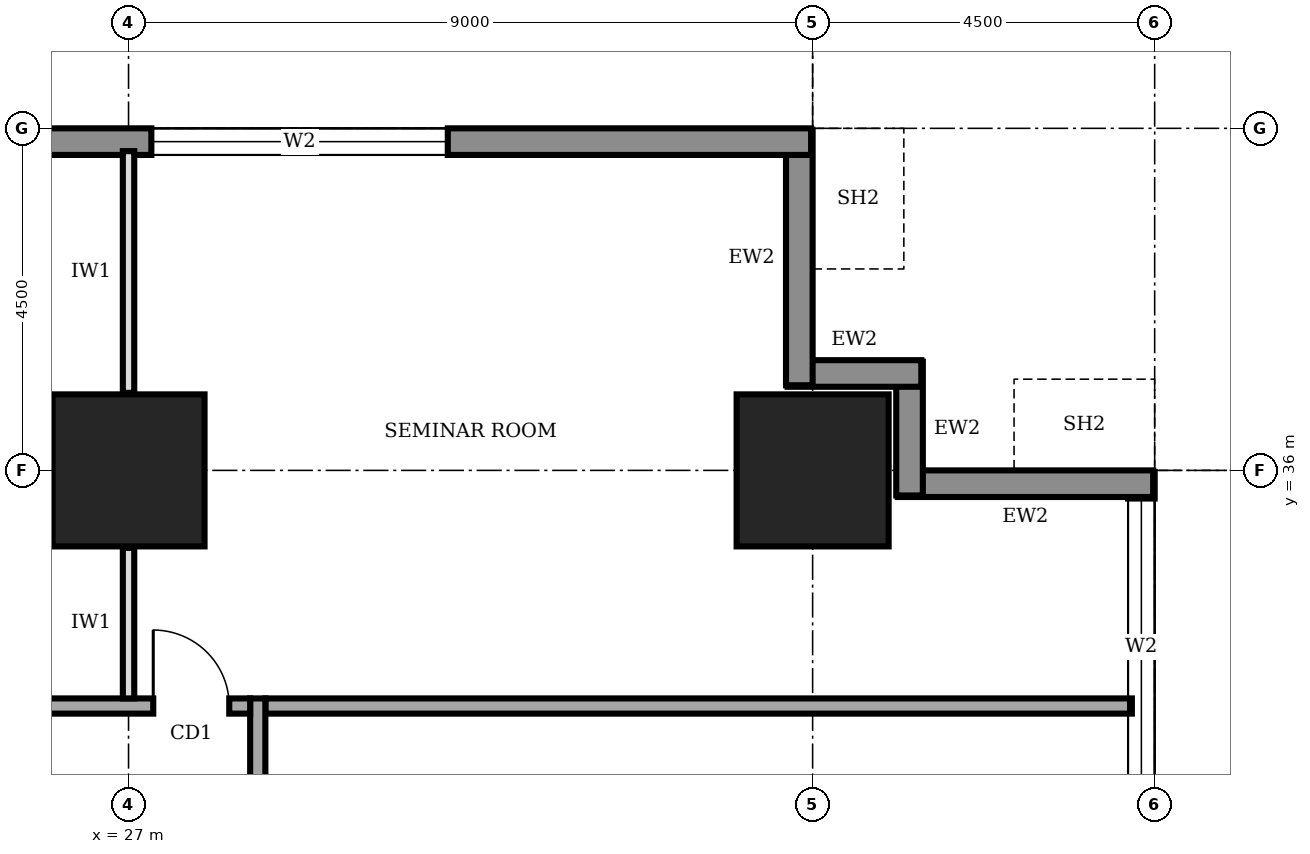
"""IFC4 building model, lengths in metres.
Left out: names, types, materials, properties, quantities, classifications, styles, units other than length and angle.
Written with IfcOpenShell. Run it as: python <this file> out.ifc"""

import sys

from ifc_helpers import new_model, si_unit, direction, frame, frame_2d, origin, origin_2d, place, context, subcontext, project, spatial, rectangle, extrude, element, fill, save


model = new_model("IFC4")
c1 = context("Model", 3, precision=1e-05, world=origin(), true_north=direction((0.0, 1.0)))
c2 = subcontext(c1, "Body", "Model", "MODEL_VIEW")
j1 = project(units=[si_unit("LENGTHUNIT", "METRE"), si_unit("PLANEANGLEUNIT", "RADIAN")], contexts=[c1])
p1 = place(None, origin())
s1 = spatial("IfcSite", under=j1, at=p1, CompositionType="ELEMENT")
p2 = place(p1, origin())
s2 = spatial("IfcBuilding", under=s1, at=p2, CompositionType="ELEMENT")
p3 = place(p2, frame((0.0, 0.0, 53.0)))
s3 = spatial("IfcBuildingStorey", under=s2, at=p3, CompositionType="ELEMENT", Elevation=53.0)
for number, where, z_axis, x_axis in (
    (1, (27.0, 36.0, 0.0), (0.0, 0.0, 1.0), (1.0, 0.0, 0.0)),
    (2, (36.0, 36.0, 0.0), (0.0, 0.0, 1.0), (1.0, 0.0, 0.0)),
):
    element("IfcColumn", number, at=place(p3, frame(where, z_axis=z_axis, x_axis=x_axis)), inside=s3, PredefinedType="COLUMN", context=c2, shape_type="SweptSolid", body=[
        extrude(rectangle(XDim=2.0, YDim=2.0, at=origin_2d()), origin(), (0.0, 0.0, 1.0), 4.0),
    ])
p4 = place(p3, frame((40.325, 4.52, 0.0), z_axis=(0.0, 0.0, 1.0), x_axis=(0.0, 1.0, 0.0)))
e3 = element("IfcWall", 3, at=p4, inside=s3, PredefinedType="STANDARD", context=c2, shape_type="SweptSolid", body=[
    extrude(rectangle(XDim=31.46, YDim=0.35, at=frame_2d((15.73, 0.0))), origin(), (0.0, 0.0, 1.0), 3.75),
])
p5 = place(p4, frame((4.78, 0.0, 0.6)))
e4 = element("IfcOpeningElement", 4, at=p5, cuts=e3, PredefinedType="OPENING", context=c2, shape_type="SweptSolid", body=[
    extrude(rectangle(XDim=3.9, YDim=2.6, at=frame_2d((1.95, 1.3))), frame((0.0, 0.185, 0.0), z_axis=(0.0, -1.0, 0.0), x_axis=(1.0, 0.0, 0.0)), (0.0, 0.0, 1.0), 0.37),
])
p6 = place(p4, frame((9.28, 0.0, 0.6)))
e5 = element("IfcOpeningElement", 5, at=p6, cuts=e3, PredefinedType="OPENING", context=c2, shape_type="SweptSolid", body=[
    extrude(rectangle(XDim=3.9, YDim=2.6, at=frame_2d((1.95, 1.3))), frame((0.0, 0.185, 0.0), z_axis=(0.0, -1.0, 0.0), x_axis=(1.0, 0.0, 0.0)), (0.0, 0.0, 1.0), 0.37),
])
p7 = place(p4, frame((13.78, 0.0, 0.6)))
e6 = element("IfcOpeningElement", 6, at=p7, cuts=e3, PredefinedType="OPENING", context=c2, shape_type="SweptSolid", body=[
    extrude(rectangle(XDim=3.9, YDim=2.6, at=frame_2d((1.95, 1.3))), frame((0.0, 0.185, 0.0), z_axis=(0.0, -1.0, 0.0), x_axis=(1.0, 0.0, 0.0)), (0.0, 0.0, 1.0), 0.37),
])
p8 = place(p4, frame((18.28, 0.0, 0.6)))
e7 = element("IfcOpeningElement", 7, at=p8, cuts=e3, PredefinedType="OPENING", context=c2, shape_type="SweptSolid", body=[
    extrude(rectangle(XDim=3.9, YDim=2.6, at=frame_2d((1.95, 1.3))), frame((0.0, 0.185, 0.0), z_axis=(0.0, -1.0, 0.0), x_axis=(1.0, 0.0, 0.0)), (0.0, 0.0, 1.0), 0.37),
])
p9 = place(p4, frame((22.78, 0.0, 0.6)))
e8 = element("IfcOpeningElement", 8, at=p9, cuts=e3, PredefinedType="OPENING", context=c2, shape_type="SweptSolid", body=[
    extrude(rectangle(XDim=3.9, YDim=2.6, at=frame_2d((1.95, 1.3))), frame((0.0, 0.185, 0.0), z_axis=(0.0, -1.0, 0.0), x_axis=(1.0, 0.0, 0.0)), (0.0, 0.0, 1.0), 0.37),
])
p10 = place(p4, frame((27.21, 0.0, 0.6)))
e9 = element("IfcOpeningElement", 9, at=p10, cuts=e3, PredefinedType="OPENING", context=c2, shape_type="SweptSolid", body=[
    extrude(rectangle(XDim=3.9, YDim=2.6, at=frame_2d((1.95, 1.3))), frame((0.0, 0.185, 0.0), z_axis=(0.0, -1.0, 0.0), x_axis=(1.0, 0.0, 0.0)), (0.0, 0.0, 1.0), 0.37),
])
p11 = place(p3, frame((40.48, 35.825, 0.0), z_axis=(0.0, 0.0, 1.0), x_axis=(-1.0, 0.0, 0.0)))
e10 = element("IfcWall", 10, at=p11, inside=s3, PredefinedType="STANDARD", context=c2, shape_type="SweptSolid", body=[
    extrude(rectangle(XDim=3.36, YDim=0.35, at=frame_2d((1.68, 0.0))), origin(), (0.0, 0.0, 1.0), 2.85),
])
for number, where, z_axis, x_axis in (
    (11, (37.275, 35.67, 0.0), (0.0, 0.0, 1.0), (0.0, 1.0, 0.0)),
    (12, (37.43, 37.275, 0.0), (0.0, 0.0, 1.0), (-1.0, 0.0, 0.0)),
):
    element("IfcWall", number, at=place(p3, frame(where, z_axis=z_axis, x_axis=x_axis)), inside=s3, PredefinedType="STANDARD", context=c2, shape_type="SweptSolid", body=[
        extrude(rectangle(XDim=1.76, YDim=0.35, at=frame_2d((0.88, 0.0))), origin(), (0.0, 0.0, 1.0), 3.75),
    ])
p12 = place(p3, frame((35.825, 37.12, 0.0), z_axis=(0.0, 0.0, 1.0), x_axis=(0.0, 1.0, 0.0)))
e13 = element("IfcWall", 13, at=p12, inside=s3, PredefinedType="STANDARD", context=c2, shape_type="SweptSolid", body=[
    extrude(rectangle(XDim=3.36, YDim=0.35, at=frame_2d((1.68, 0.0))), origin(), (0.0, 0.0, 1.0), 2.85),
])
p13 = place(p3, frame((35.98, 40.325, 0.0), z_axis=(0.0, 0.0, 1.0), x_axis=(-1.0, 0.0, 0.0)))
e14 = element("IfcWall", 14, at=p13, inside=s3, PredefinedType="STANDARD", context=c2, shape_type="SweptSolid", body=[
    extrude(rectangle(XDim=31.46, YDim=0.35, at=frame_2d((15.73, 0.0))), origin(), (0.0, 0.0, 1.0), 3.75),
])
p14 = place(p13, frame((27.21, 0.0, 0.6)))
e15 = element("IfcOpeningElement", 15, at=p14, cuts=e14, PredefinedType="OPENING", context=c2, shape_type="SweptSolid", body=[
    extrude(rectangle(XDim=3.9, YDim=2.6, at=frame_2d((1.95, 1.3))), frame((0.0, 0.185, 0.0), z_axis=(0.0, -1.0, 0.0), x_axis=(1.0, 0.0, 0.0)), (0.0, 0.0, 1.0), 0.37),
])
p15 = place(p13, frame((22.78, 0.0, 0.6)))
e16 = element("IfcOpeningElement", 16, at=p15, cuts=e14, PredefinedType="OPENING", context=c2, shape_type="SweptSolid", body=[
    extrude(rectangle(XDim=3.9, YDim=2.6, at=frame_2d((1.95, 1.3))), frame((0.0, 0.185, 0.0), z_axis=(0.0, -1.0, 0.0), x_axis=(1.0, 0.0, 0.0)), (0.0, 0.0, 1.0), 0.37),
])
p16 = place(p13, frame((4.78, 0.0, 0.6)))
e17 = element("IfcOpeningElement", 17, at=p16, cuts=e14, PredefinedType="OPENING", context=c2, shape_type="SweptSolid", body=[
    extrude(rectangle(XDim=3.9, YDim=2.6, at=frame_2d((1.95, 1.3))), frame((0.0, 0.185, 0.0), z_axis=(0.0, -1.0, 0.0), x_axis=(1.0, 0.0, 0.0)), (0.0, 0.0, 1.0), 0.37),
])
p17 = place(p3, frame((28.7, 9.2, 0.0), z_axis=(0.0, 0.0, 1.0), x_axis=(0.0, 1.0, 0.0)))
e18 = element("IfcWall", 18, at=p17, inside=s3, PredefinedType="SOLIDWALL", context=c2, shape_type="SweptSolid", body=[
    extrude(rectangle(XDim=23.8, YDim=0.2, at=frame_2d((11.9, 0.0))), origin(), (0.0, 0.0, 1.0), 3.75),
])
p18 = place(p17, frame((3.4, 0.0, 0.0)))
e19 = element("IfcOpeningElement", 19, at=p18, cuts=e18, PredefinedType="OPENING", context=c2, shape_type="SweptSolid", body=[
    extrude(rectangle(XDim=1.8, YDim=2.1, at=frame_2d((0.9, 1.05))), frame((0.0, 0.11, 0.0), z_axis=(0.0, -1.0, 0.0), x_axis=(1.0, 0.0, 0.0)), (0.0, 0.0, 1.0), 0.22),
])
p19 = place(p17, frame((10.55, 0.0, 0.0)))
e20 = element("IfcOpeningElement", 20, at=p19, cuts=e18, PredefinedType="OPENING", context=c2, shape_type="SweptSolid", body=[
    extrude(rectangle(XDim=1.0, YDim=2.1, at=frame_2d((0.5, 1.05))), frame((0.0, 0.11, 0.0), z_axis=(0.0, -1.0, 0.0), x_axis=(1.0, 0.0, 0.0)), (0.0, 0.0, 1.0), 0.22),
])
p20 = place(p17, frame((17.65, 0.0, 0.0)))
e21 = element("IfcOpeningElement", 21, at=p20, cuts=e18, PredefinedType="OPENING", context=c2, shape_type="SweptSolid", body=[
    extrude(rectangle(XDim=1.8, YDim=2.1, at=frame_2d((0.9, 1.05))), frame((0.0, 0.11, 0.0), z_axis=(0.0, -1.0, 0.0), x_axis=(1.0, 0.0, 0.0)), (0.0, 0.0, 1.0), 0.22),
])
p21 = place(p3, frame((28.6, 32.9, 0.0), z_axis=(0.0, 0.0, 1.0), x_axis=(-1.0, 0.0, 0.0)))
e22 = element("IfcWall", 22, at=p21, inside=s3, PredefinedType="SOLIDWALL", context=c2, shape_type="SweptSolid", body=[
    extrude(rectangle(XDim=16.9, YDim=0.2, at=frame_2d((8.45, 0.0))), origin(), (0.0, 0.0, 1.0), 3.75),
])
p22 = place(p21, frame((15.425, 0.0, 0.0)))
e23 = element("IfcOpeningElement", 23, at=p22, cuts=e22, PredefinedType="OPENING", context=c2, shape_type="SweptSolid", body=[
    extrude(rectangle(XDim=1.0, YDim=2.1, at=frame_2d((0.5, 1.05))), frame((0.0, 0.11, 0.0), z_axis=(0.0, -1.0, 0.0), x_axis=(1.0, 0.0, 0.0)), (0.0, 0.0, 1.0), 0.22),
])
p23 = place(p21, frame((12.35, 0.0, 0.0)))
e24 = element("IfcOpeningElement", 24, at=p23, cuts=e22, PredefinedType="OPENING", context=c2, shape_type="SweptSolid", body=[
    extrude(rectangle(XDim=1.0, YDim=2.1, at=frame_2d((0.5, 1.05))), frame((0.0, 0.11, 0.0), z_axis=(0.0, -1.0, 0.0), x_axis=(1.0, 0.0, 0.0)), (0.0, 0.0, 1.0), 0.22),
])
p24 = place(p21, frame((5.6, 0.0, 0.0)))
e25 = element("IfcOpeningElement", 25, at=p24, cuts=e22, PredefinedType="OPENING", context=c2, shape_type="SweptSolid", body=[
    extrude(rectangle(XDim=1.0, YDim=2.1, at=frame_2d((0.5, 1.05))), frame((0.0, 0.11, 0.0), z_axis=(0.0, -1.0, 0.0), x_axis=(1.0, 0.0, 0.0)), (0.0, 0.0, 1.0), 0.22),
])
p25 = place(p21, frame((0.275, 0.0, 0.0)))
e26 = element("IfcOpeningElement", 26, at=p25, cuts=e22, PredefinedType="OPENING", context=c2, shape_type="SweptSolid", body=[
    extrude(rectangle(XDim=1.0, YDim=2.1, at=frame_2d((0.5, 1.05))), frame((0.0, 0.11, 0.0), z_axis=(0.0, -1.0, 0.0), x_axis=(1.0, 0.0, 0.0)), (0.0, 0.0, 1.0), 0.22),
])
p26 = place(p3, frame((28.8, 32.9, 0.0), z_axis=(0.0, 0.0, 1.0), x_axis=(1.0, 0.0, 0.0)))
e27 = element("IfcWall", 27, at=p26, inside=s3, PredefinedType="SOLIDWALL", context=c2, shape_type="SweptSolid", body=[
    extrude(rectangle(XDim=11.4, YDim=0.2, at=frame_2d((5.7, 0.0))), origin(), (0.0, 0.0, 1.0), 3.75),
])
p27 = place(p3, frame((27.0, 33.0, 0.0), z_axis=(0.0, 0.0, 1.0), x_axis=(0.0, 1.0, 0.0)))
e28 = element("IfcWall", 28, at=p27, inside=s3, PredefinedType="PARTITIONING", context=c2, shape_type="SweptSolid", body=[
    extrude(rectangle(XDim=1.98, YDim=0.15, at=frame_2d((0.99, 0.0))), origin(), (0.0, 0.0, 1.0), 2.85),
])
p28 = place(p3, frame((27.0, 37.02, 0.0), z_axis=(0.0, 0.0, 1.0), x_axis=(0.0, 1.0, 0.0)))
e29 = element("IfcWall", 29, at=p28, inside=s3, PredefinedType="PARTITIONING", context=c2, shape_type="SweptSolid", body=[
    extrude(rectangle(XDim=3.18, YDim=0.15, at=frame_2d((1.59, 0.0))), origin(), (0.0, 0.0, 1.0), 2.85),
])
p29 = place(p10, origin())
e30 = element("IfcWindow", 30, at=p29, inside=s3, PartitioningType="SINGLE_PANEL", PredefinedType="WINDOW", context=c2, shape_type="SweptSolid", body=[
    extrude(rectangle(XDim=3.9, YDim=2.6, at=frame_2d((1.95, 1.3))), frame((0.0, 0.03, 0.0), z_axis=(0.0, -1.0, 0.0), x_axis=(1.0, 0.0, 0.0)), (0.0, 0.0, 1.0), 0.06),
])
fill(e9, e30)
p30 = place(p16, origin())
e31 = element("IfcWindow", 31, at=p30, inside=s3, PartitioningType="SINGLE_PANEL", PredefinedType="WINDOW", context=c2, shape_type="SweptSolid", body=[
    extrude(rectangle(XDim=3.9, YDim=2.6, at=frame_2d((1.95, 1.3))), frame((0.0, 0.03, 0.0), z_axis=(0.0, -1.0, 0.0), x_axis=(1.0, 0.0, 0.0)), (0.0, 0.0, 1.0), 0.06),
])
fill(e17, e31)
p31 = place(p25, frame((1.0, 0.0, 0.0), z_axis=(0.0, 0.0, 1.0), x_axis=(-1.0, 0.0, 0.0)))
e32 = element("IfcDoor", 32, at=p31, inside=s3, OperationType="SINGLE_SWING_LEFT", PredefinedType="DOOR", context=c2, shape_type="SweptSolid", body=[
    extrude(rectangle(XDim=1.0, YDim=2.1, at=frame_2d((0.5, 1.05))), frame((0.0, 0.025, 0.0), z_axis=(0.0, -1.0, 0.0), x_axis=(1.0, 0.0, 0.0)), (0.0, 0.0, 1.0), 0.05),
])
fill(e26, e32)
save(model, sys.argv[1])
